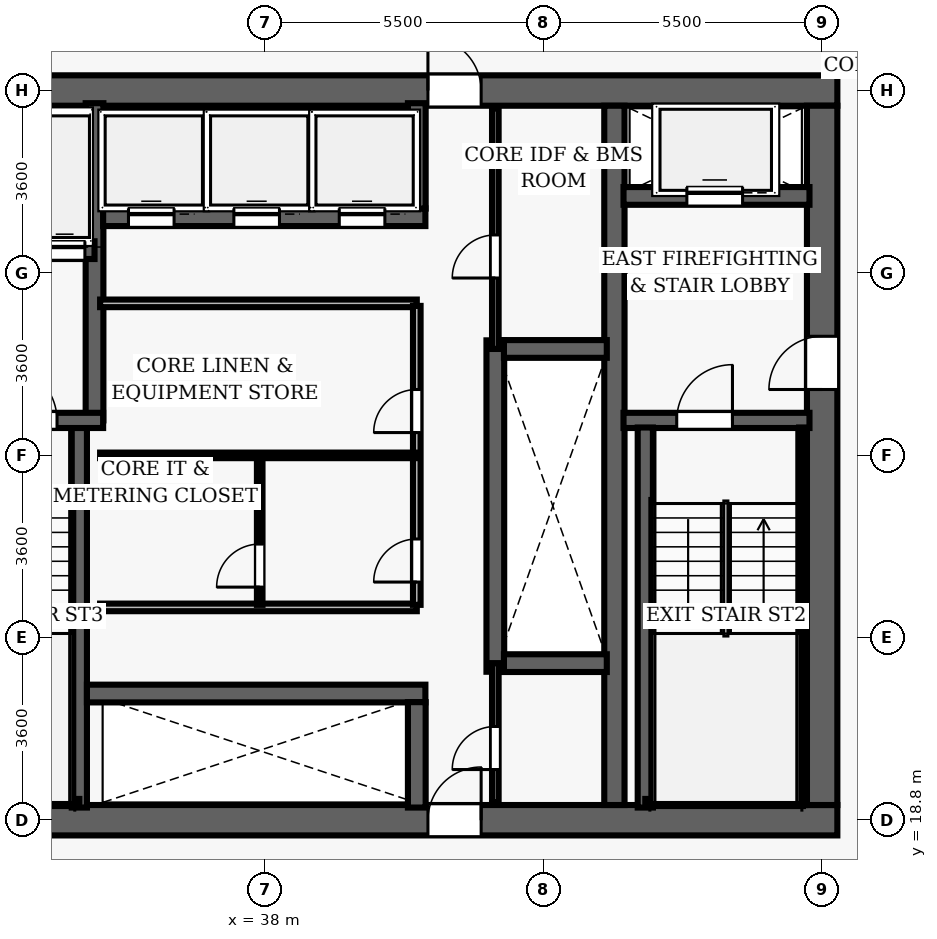
"""IFC4 building model, lengths in metres.
Left out: names, types, materials, properties, quantities, classifications, styles, units other than length and angle.
Written with IfcOpenShell. Run it as: python <this file> out.ifc"""

import sys

from ifc_helpers import new_model, si_unit, direction, frame, frame_2d, origin, place, context, subcontext, project, spatial, rectangle, extrude, element, fill, save


model = new_model("IFC4")
c1 = context("Model", 3, precision=1e-05, world=origin(), true_north=direction((0.0, 1.0)))
c2 = subcontext(c1, "Body", "Model", "MODEL_VIEW")
j1 = project(units=[si_unit("LENGTHUNIT", "METRE"), si_unit("PLANEANGLEUNIT", "RADIAN")], contexts=[c1])
p1 = place(None, origin())
s1 = spatial("IfcSite", under=j1, at=p1, CompositionType="ELEMENT")
p2 = place(p1, origin())
s2 = spatial("IfcBuilding", under=s1, at=p2, CompositionType="ELEMENT")
p3 = place(p2, frame((0.0, 0.0, 79.9)))
s3 = spatial("IfcBuildingStorey", under=s2, at=p3, CompositionType="ELEMENT", Elevation=79.9)
p4 = place(p3, frame((26.7, 18.8, 0.0), z_axis=(0.0, 0.0, 1.0), x_axis=(1.0, 0.0, 0.0)))
e1 = element("IfcWall", 1, at=p4, inside=s3, PredefinedType="SHEAR", context=c2, shape_type="SweptSolid", body=[
    extrude(rectangle(XDim=22.6, YDim=0.6, at=frame_2d((11.3, 0.0))), origin(), (0.0, 0.0, 1.0), 3.5),
])
p5 = place(p4, frame((14.52, 0.0, 0.0)))
e2 = element("IfcOpeningElement", 2, at=p5, cuts=e1, PredefinedType="OPENING", context=c2, shape_type="SweptSolid", body=[
    extrude(rectangle(XDim=1.05, YDim=2.15, at=frame_2d((0.525, 1.075))), frame((0.0, 0.31, 0.0), z_axis=(0.0, -1.0, 0.0), x_axis=(1.0, 0.0, 0.0)), (0.0, 0.0, 1.0), 0.62),
])
p6 = place(p3, frame((26.7, 33.2, 0.0), z_axis=(0.0, 0.0, 1.0), x_axis=(1.0, 0.0, 0.0)))
e3 = element("IfcWall", 3, at=p6, inside=s3, PredefinedType="SHEAR", context=c2, shape_type="SweptSolid", body=[
    extrude(rectangle(XDim=22.6, YDim=0.6, at=frame_2d((11.3, 0.0))), origin(), (0.0, 0.0, 1.0), 3.5),
])
p7 = place(p6, frame((4.62, 0.0, 0.0)))
e4 = element("IfcOpeningElement", 4, at=p7, cuts=e3, PredefinedType="OPENING", context=c2, shape_type="SweptSolid", body=[
    extrude(rectangle(XDim=1.05, YDim=2.15, at=frame_2d((0.525, 1.075))), frame((0.0, 0.31, 0.0), z_axis=(0.0, -1.0, 0.0), x_axis=(1.0, 0.0, 0.0)), (0.0, 0.0, 1.0), 0.62),
])
p8 = place(p6, frame((14.52, 0.0, 0.0)))
e5 = element("IfcOpeningElement", 5, at=p8, cuts=e3, PredefinedType="OPENING", context=c2, shape_type="SweptSolid", body=[
    extrude(rectangle(XDim=1.05, YDim=2.15, at=frame_2d((0.525, 1.075))), frame((0.0, 0.31, 0.0), z_axis=(0.0, -1.0, 0.0), x_axis=(1.0, 0.0, 0.0)), (0.0, 0.0, 1.0), 0.62),
])
p9 = place(p3, frame((49.0, 19.1, 0.0), z_axis=(0.0, 0.0, 1.0), x_axis=(0.0, 1.0, 0.0)))
e6 = element("IfcWall", 6, at=p9, inside=s3, PredefinedType="SHEAR", context=c2, shape_type="SweptSolid", body=[
    extrude(rectangle(XDim=13.8, YDim=0.6, at=frame_2d((6.9, 0.0))), origin(), (0.0, 0.0, 1.0), 3.5),
])
p10 = place(p9, frame((8.2, 0.0, 0.0)))
e7 = element("IfcOpeningElement", 7, at=p10, cuts=e6, PredefinedType="OPENING", context=c2, shape_type="SweptSolid", body=[
    extrude(rectangle(XDim=1.05, YDim=2.15, at=frame_2d((0.525, 1.075))), frame((0.0, 0.31, 0.0), z_axis=(0.0, -1.0, 0.0), x_axis=(1.0, 0.0, 0.0)), (0.0, 0.0, 1.0), 0.62),
])
p11 = place(p3, frame((44.9, 19.1, 0.0), z_axis=(0.0, 0.0, 1.0), x_axis=(0.0, 1.0, 0.0)))
e8 = element("IfcWall", 8, at=p11, inside=s3, PredefinedType="SHEAR", context=c2, shape_type="SweptSolid", body=[
    extrude(rectangle(XDim=13.8, YDim=0.4, at=frame_2d((6.9, 0.0))), origin(), (0.0, 0.0, 1.0), 3.5),
])
p12 = place(p3, frame((45.08, 26.69, 0.0), z_axis=(0.0, 0.0, 1.0), x_axis=(1.0, 0.0, 0.0)))
e9 = element("IfcWall", 9, at=p12, inside=s3, PredefinedType="SHEAR", context=c2, shape_type="SweptSolid", body=[
    extrude(rectangle(XDim=3.67, YDim=0.3, at=frame_2d((1.835, 0.0))), origin(), (0.0, 0.0, 1.0), 3.5),
])
p13 = place(p12, frame((1.05, 0.0, 0.0)))
e10 = element("IfcOpeningElement", 10, at=p13, cuts=e9, PredefinedType="OPENING", context=c2, shape_type="SweptSolid", body=[
    extrude(rectangle(XDim=1.1, YDim=2.15, at=frame_2d((0.55, 1.075))), frame((0.0, 0.16, 0.0), z_axis=(0.0, -1.0, 0.0), x_axis=(1.0, 0.0, 0.0)), (0.0, 0.0, 1.0), 0.32),
])
p14 = place(p3, frame((45.51, 19.05, 0.0), z_axis=(0.0, 0.0, 1.0), x_axis=(0.0, 1.0, 0.0)))
e11 = element("IfcWall", 11, at=p14, inside=s3, PredefinedType="SHEAR", context=c2, shape_type="SweptSolid", body=[
    extrude(rectangle(XDim=7.5, YDim=0.3, at=frame_2d((3.75, 0.0))), origin(), (0.0, 0.0, 1.0), 3.5),
])
p15 = place(p3, frame((48.605, 19.1, 0.0), z_axis=(0.0, 0.0, 1.0), x_axis=(0.0, 1.0, 0.0)))
e12 = element("IfcWall", 12, at=p15, inside=s3, PredefinedType="SHEAR", context=c2, shape_type="SweptSolid", body=[
    extrude(rectangle(XDim=7.45, YDim=0.12, at=frame_2d((3.725, 0.0))), origin(), (0.0, 0.0, 1.0), 3.5),
])
p16 = place(p3, frame((45.51, 19.16, 0.0), z_axis=(0.0, 0.0, 1.0), x_axis=(1.0, 0.0, 0.0)))
e13 = element("IfcWall", 13, at=p16, inside=s3, PredefinedType="SHEAR", context=c2, shape_type="SweptSolid", body=[
    extrude(rectangle(XDim=3.095, YDim=0.12, at=frame_2d((1.547, 0.0))), origin(), (0.0, 0.0, 1.0), 3.5),
])
p17 = place(p3, frame((45.08, 31.12, 0.0), z_axis=(0.0, 0.0, 1.0), x_axis=(1.0, 0.0, 0.0)))
e14 = element("IfcWall", 14, at=p17, inside=s3, PredefinedType="SHEAR", context=c2, shape_type="SweptSolid", body=[
    extrude(rectangle(XDim=3.67, YDim=0.35, at=frame_2d((1.835, 0.0))), origin(), (0.0, 0.0, 1.0), 2.6),
])
p18 = place(p17, frame((1.25, 0.0, 0.0)))
e15 = element("IfcOpeningElement", 15, at=p18, cuts=e14, PredefinedType="OPENING", context=c2, shape_type="SweptSolid", body=[
    extrude(rectangle(XDim=1.1, YDim=2.15, at=frame_2d((0.55, 1.075))), frame((0.0, 0.185, 0.0), z_axis=(0.0, -1.0, 0.0), x_axis=(1.0, 0.0, 0.0)), (0.0, 0.0, 1.0), 0.37),
])
p19 = place(p3, frame((34.34, 19.05, 0.0), z_axis=(0.0, 0.0, 1.0), x_axis=(0.0, 1.0, 0.0)))
e16 = element("IfcWall", 16, at=p19, inside=s3, PredefinedType="SHEAR", context=c2, shape_type="SweptSolid", body=[
    extrude(rectangle(XDim=7.5, YDim=0.3, at=frame_2d((3.75, 0.0))), origin(), (0.0, 0.0, 1.0), 3.5),
])
p20 = place(p3, frame((34.64, 26.69, 0.0), z_axis=(0.0, 0.0, 1.0), x_axis=(0.0, 1.0, 0.0)))
e17 = element("IfcWall", 17, at=p20, inside=s3, PredefinedType="SHEAR", context=c2, shape_type="SweptSolid", body=[
    extrude(rectangle(XDim=6.26, YDim=0.35, at=frame_2d((3.13, 0.0))), origin(), (0.0, 0.0, 1.0), 3.5),
])
p21 = place(p3, frame((31.25, 26.69, 0.0), z_axis=(0.0, 0.0, 1.0), x_axis=(1.0, 0.0, 0.0)))
e18 = element("IfcWall", 18, at=p21, inside=s3, PredefinedType="SHEAR", context=c2, shape_type="SweptSolid", body=[
    extrude(rectangle(XDim=3.56, YDim=0.3, at=frame_2d((1.78, 0.0))), origin(), (0.0, 0.0, 1.0), 3.5),
])
p22 = place(p21, frame((1.55, 0.0, 0.0)))
e19 = element("IfcOpeningElement", 19, at=p22, cuts=e18, PredefinedType="OPENING", context=c2, shape_type="SweptSolid", body=[
    extrude(rectangle(XDim=1.1, YDim=2.15, at=frame_2d((0.55, 1.075))), frame((0.0, 0.16, 0.0), z_axis=(0.0, -1.0, 0.0), x_axis=(1.0, 0.0, 0.0)), (0.0, 0.0, 1.0), 0.32),
])
p23 = place(p3, frame((31.3, 19.16, 0.0), z_axis=(0.0, 0.0, 1.0), x_axis=(1.0, 0.0, 0.0)))
e20 = element("IfcWall", 20, at=p23, inside=s3, PredefinedType="SHEAR", context=c2, shape_type="SweptSolid", body=[
    extrude(rectangle(XDim=3.04, YDim=0.12, at=frame_2d((1.52, 0.0))), origin(), (0.0, 0.0, 1.0), 3.5),
])
p24 = place(p3, frame((32.23, 30.05, 0.0), z_axis=(0.0, 0.0, 1.0), x_axis=(1.0, 0.0, 0.0)))
e21 = element("IfcWall", 21, at=p24, inside=s3, PredefinedType="SHEAR", context=c2, shape_type="SweptSolid", body=[
    extrude(rectangle(XDim=2.41, YDim=0.35, at=frame_2d((1.205, 0.0))), origin(), (0.0, 0.0, 1.0), 2.6),
])
p25 = place(p24, frame((0.42, 0.0, 0.0)))
e22 = element("IfcOpeningElement", 22, at=p25, cuts=e21, PredefinedType="OPENING", context=c2, shape_type="SweptSolid", body=[
    extrude(rectangle(XDim=0.8, YDim=2.15, at=frame_2d((0.4, 1.075))), frame((0.0, 0.185, 0.0), z_axis=(0.0, -1.0, 0.0), x_axis=(1.0, 0.0, 0.0)), (0.0, 0.0, 1.0), 0.37),
])
p26 = place(p24, frame((1.42, 0.0, 0.0)))
e23 = element("IfcOpeningElement", 23, at=p26, cuts=e21, PredefinedType="OPENING", context=c2, shape_type="SweptSolid", body=[
    extrude(rectangle(XDim=0.8, YDim=2.15, at=frame_2d((0.4, 1.075))), frame((0.0, 0.185, 0.0), z_axis=(0.0, -1.0, 0.0), x_axis=(1.0, 0.0, 0.0)), (0.0, 0.0, 1.0), 0.37),
])
p27 = place(p3, frame((42.55, 21.73, 0.0), z_axis=(0.0, 0.0, 1.0), x_axis=(0.0, 1.0, 0.0)))
e24 = element("IfcWall", 24, at=p27, inside=s3, PredefinedType="SHEAR", context=c2, shape_type="SweptSolid", body=[
    extrude(rectangle(XDim=6.54, YDim=0.35, at=frame_2d((3.27, 0.0))), origin(), (0.0, 0.0, 1.0), 2.6),
])
for number, where, z_axis, x_axis in (
    (25, (42.72, 21.9, 0.0), (0.0, 0.0, 1.0), (1.0, 0.0, 0.0)),
    (26, (42.72, 28.1, 0.0), (0.0, 0.0, 1.0), (1.0, 0.0, 0.0)),
):
    element("IfcWall", number, at=place(p3, frame(where, z_axis=z_axis, x_axis=x_axis)), inside=s3, PredefinedType="SHEAR", context=c2, shape_type="SweptSolid", body=[
        extrude(rectangle(XDim=2.03, YDim=0.35, at=frame_2d((1.015, 0.0))), origin(), (0.0, 0.0, 1.0), 2.6),
    ])
p28 = place(p3, frame((34.81, 30.7, 0.0), z_axis=(0.0, 0.0, 1.0), x_axis=(1.0, 0.0, 0.0)))
e27 = element("IfcWall", 27, at=p28, inside=s3, PredefinedType="SHEAR", context=c2, shape_type="SweptSolid", body=[
    extrude(rectangle(XDim=6.36, YDim=0.35, at=frame_2d((3.18, 0.0))), origin(), (0.0, 0.0, 1.0), 2.6),
])
p29 = place(p28, frame((0.5, 0.0, 0.0)))
e28 = element("IfcOpeningElement", 28, at=p29, cuts=e27, PredefinedType="OPENING", context=c2, shape_type="SweptSolid", body=[
    extrude(rectangle(XDim=0.9, YDim=2.15, at=frame_2d((0.45, 1.075))), frame((0.0, 0.185, 0.0), z_axis=(0.0, -1.0, 0.0), x_axis=(1.0, 0.0, 0.0)), (0.0, 0.0, 1.0), 0.37),
])
p30 = place(p28, frame((2.58, 0.0, 0.0)))
e29 = element("IfcOpeningElement", 29, at=p30, cuts=e27, PredefinedType="OPENING", context=c2, shape_type="SweptSolid", body=[
    extrude(rectangle(XDim=0.9, YDim=2.15, at=frame_2d((0.45, 1.075))), frame((0.0, 0.185, 0.0), z_axis=(0.0, -1.0, 0.0), x_axis=(1.0, 0.0, 0.0)), (0.0, 0.0, 1.0), 0.37),
])
p31 = place(p28, frame((4.66, 0.0, 0.0)))
e30 = element("IfcOpeningElement", 30, at=p31, cuts=e27, PredefinedType="OPENING", context=c2, shape_type="SweptSolid", body=[
    extrude(rectangle(XDim=0.9, YDim=2.15, at=frame_2d((0.45, 1.075))), frame((0.0, 0.185, 0.0), z_axis=(0.0, -1.0, 0.0), x_axis=(1.0, 0.0, 0.0)), (0.0, 0.0, 1.0), 0.37),
])
p32 = place(p3, frame((41.0, 30.87, 0.0), z_axis=(0.0, 0.0, 1.0), x_axis=(0.0, 1.0, 0.0)))
e31 = element("IfcWall", 31, at=p32, inside=s3, PredefinedType="SHEAR", context=c2, shape_type="SweptSolid", body=[
    extrude(rectangle(XDim=2.08, YDim=0.35, at=frame_2d((1.04, 0.0))), origin(), (0.0, 0.0, 1.0), 2.6),
])
p33 = place(p3, frame((34.49, 21.3, 0.0), z_axis=(0.0, 0.0, 1.0), x_axis=(1.0, 0.0, 0.0)))
e32 = element("IfcWall", 32, at=p33, inside=s3, PredefinedType="SHEAR", context=c2, shape_type="SweptSolid", body=[
    extrude(rectangle(XDim=6.68, YDim=0.35, at=frame_2d((3.34, 0.0))), origin(), (0.0, 0.0, 1.0), 2.6),
])
p34 = place(p3, frame((41.0, 19.05, 0.0), z_axis=(0.0, 0.0, 1.0), x_axis=(0.0, 1.0, 0.0)))
e33 = element("IfcWall", 33, at=p34, inside=s3, PredefinedType="SHEAR", context=c2, shape_type="SweptSolid", body=[
    extrude(rectangle(XDim=2.08, YDim=0.35, at=frame_2d((1.04, 0.0))), origin(), (0.0, 0.0, 1.0), 2.6),
])
for number, where, z_axis, x_axis in (
    (34, (34.75, 29.0, 0.0), (0.0, 0.0, 1.0), (1.0, 0.0, 0.0)),
    (35, (34.75, 23.0, 0.0), (0.0, 0.0, 1.0), (1.0, 0.0, 0.0)),
):
    element("IfcWall", number, at=place(p3, frame(where, z_axis=z_axis, x_axis=x_axis)), inside=s3, PredefinedType="PARTITIONING", context=c2, shape_type="SweptSolid", body=[
        extrude(rectangle(XDim=6.25, YDim=0.15, at=frame_2d((3.125, 0.0))), origin(), (0.0, 0.0, 1.0), 2.6),
    ])
p35 = place(p3, frame((41.0, 23.05, 0.0), z_axis=(0.0, 0.0, 1.0), x_axis=(0.0, 1.0, 0.0)))
e36 = element("IfcWall", 36, at=p35, inside=s3, PredefinedType="PARTITIONING", context=c2, shape_type="SweptSolid", body=[
    extrude(rectangle(XDim=5.9, YDim=0.15, at=frame_2d((2.95, 0.0))), origin(), (0.0, 0.0, 1.0), 2.6),
])
p36 = place(p35, frame((3.4, 0.0, 0.0)))
e37 = element("IfcOpeningElement", 37, at=p36, cuts=e36, PredefinedType="OPENING", context=c2, shape_type="SweptSolid", body=[
    extrude(rectangle(XDim=0.85, YDim=2.1, at=frame_2d((0.425, 1.05))), frame((0.0, 0.085, 0.0), z_axis=(0.0, -1.0, 0.0), x_axis=(1.0, 0.0, 0.0)), (0.0, 0.0, 1.0), 0.17),
])
p37 = place(p35, frame((0.45, 0.0, 0.0)))
e38 = element("IfcOpeningElement", 38, at=p37, cuts=e36, PredefinedType="OPENING", context=c2, shape_type="SweptSolid", body=[
    extrude(rectangle(XDim=0.85, YDim=2.1, at=frame_2d((0.425, 1.05))), frame((0.0, 0.085, 0.0), z_axis=(0.0, -1.0, 0.0), x_axis=(1.0, 0.0, 0.0)), (0.0, 0.0, 1.0), 0.17),
])
p38 = place(p3, frame((34.75, 26.0, 0.0), z_axis=(0.0, 0.0, 1.0), x_axis=(1.0, 0.0, 0.0)))
e39 = element("IfcWall", 39, at=p38, inside=s3, PredefinedType="PARTITIONING", context=c2, shape_type="SweptSolid", body=[
    extrude(rectangle(XDim=6.25, YDim=0.11, at=frame_2d((3.125, 0.0))), origin(), (0.0, 0.0, 1.0), 2.6),
])
p39 = place(p3, frame((37.9, 23.05, 0.0), z_axis=(0.0, 0.0, 1.0), x_axis=(0.0, 1.0, 0.0)))
e40 = element("IfcWall", 40, at=p39, inside=s3, PredefinedType="PARTITIONING", context=c2, shape_type="SweptSolid", body=[
    extrude(rectangle(XDim=2.95, YDim=0.11, at=frame_2d((1.475, 0.0))), origin(), (0.0, 0.0, 1.0), 2.6),
])
p40 = place(p39, frame((0.35, 0.0, 0.0)))
e41 = element("IfcOpeningElement", 41, at=p40, cuts=e40, PredefinedType="OPENING", context=c2, shape_type="SweptSolid", body=[
    extrude(rectangle(XDim=0.85, YDim=2.1, at=frame_2d((0.425, 1.05))), frame((0.0, 0.065, 0.0), z_axis=(0.0, -1.0, 0.0), x_axis=(1.0, 0.0, 0.0)), (0.0, 0.0, 1.0), 0.13),
])
p41 = place(p3, frame((42.55, 28.1, 0.0), z_axis=(0.0, 0.0, 1.0), x_axis=(0.0, 1.0, 0.0)))
e42 = element("IfcWall", 42, at=p41, inside=s3, PredefinedType="PARTITIONING", context=c2, shape_type="SweptSolid", body=[
    extrude(rectangle(XDim=4.75, YDim=0.13, at=frame_2d((2.375, 0.0))), origin(), (0.0, 0.0, 1.0), 2.6),
])
p42 = place(p41, frame((1.4, 0.0, 0.0)))
e43 = element("IfcOpeningElement", 43, at=p42, cuts=e42, PredefinedType="OPENING", context=c2, shape_type="SweptSolid", body=[
    extrude(rectangle(XDim=0.85, YDim=2.1, at=frame_2d((0.425, 1.05))), frame((0.0, 0.075, 0.0), z_axis=(0.0, -1.0, 0.0), x_axis=(1.0, 0.0, 0.0)), (0.0, 0.0, 1.0), 0.15),
])
p43 = place(p3, frame((42.55, 19.15, 0.0), z_axis=(0.0, 0.0, 1.0), x_axis=(0.0, 1.0, 0.0)))
e44 = element("IfcWall", 44, at=p43, inside=s3, PredefinedType="PARTITIONING", context=c2, shape_type="SweptSolid", body=[
    extrude(rectangle(XDim=2.75, YDim=0.13, at=frame_2d((1.375, 0.0))), origin(), (0.0, 0.0, 1.0), 2.6),
])
p44 = place(p43, frame((0.65, 0.0, 0.0)))
e45 = element("IfcOpeningElement", 45, at=p44, cuts=e44, PredefinedType="OPENING", context=c2, shape_type="SweptSolid", body=[
    extrude(rectangle(XDim=0.85, YDim=2.1, at=frame_2d((0.425, 1.05))), frame((0.0, 0.075, 0.0), z_axis=(0.0, -1.0, 0.0), x_axis=(1.0, 0.0, 0.0)), (0.0, 0.0, 1.0), 0.15),
])
p45 = place(p13, origin())
e46 = element("IfcDoor", 46, at=p45, inside=s3, OperationType="SINGLE_SWING_RIGHT", PredefinedType="DOOR", context=c2, shape_type="SweptSolid", body=[
    extrude(rectangle(XDim=1.1, YDim=2.15, at=frame_2d((0.55, 1.075))), frame((0.0, 0.025, 0.0), z_axis=(0.0, -1.0, 0.0), x_axis=(1.0, 0.0, 0.0)), (0.0, 0.0, 1.0), 0.05),
])
fill(e10, e46)
p46 = place(p10, origin())
e47 = element("IfcDoor", 47, at=p46, inside=s3, OperationType="SINGLE_SWING_LEFT", PredefinedType="DOOR", context=c2, shape_type="SweptSolid", body=[
    extrude(rectangle(XDim=1.05, YDim=2.15, at=frame_2d((0.525, 1.075))), frame((0.0, 0.025, 0.0), z_axis=(0.0, -1.0, 0.0), x_axis=(1.0, 0.0, 0.0)), (0.0, 0.0, 1.0), 0.05),
])
fill(e7, e47)
p47 = place(p22, origin())
e48 = element("IfcDoor", 48, at=p47, inside=s3, OperationType="SINGLE_SWING_LEFT", PredefinedType="DOOR", context=c2, shape_type="SweptSolid", body=[
    extrude(rectangle(XDim=1.1, YDim=2.15, at=frame_2d((0.55, 1.075))), frame((0.0, 0.025, 0.0), z_axis=(0.0, -1.0, 0.0), x_axis=(1.0, 0.0, 0.0)), (0.0, 0.0, 1.0), 0.05),
])
fill(e19, e48)
p48 = place(p8, origin())
e49 = element("IfcDoor", 49, at=p48, inside=s3, OperationType="SINGLE_SWING_LEFT", PredefinedType="DOOR", context=c2, shape_type="SweptSolid", body=[
    extrude(rectangle(XDim=1.05, YDim=2.15, at=frame_2d((0.525, 1.075))), frame((0.0, 0.025, 0.0), z_axis=(0.0, -1.0, 0.0), x_axis=(1.0, 0.0, 0.0)), (0.0, 0.0, 1.0), 0.05),
])
fill(e5, e49)
p49 = place(p5, origin())
e50 = element("IfcDoor", 50, at=p49, inside=s3, OperationType="SINGLE_SWING_RIGHT", PredefinedType="DOOR", context=c2, shape_type="SweptSolid", body=[
    extrude(rectangle(XDim=1.05, YDim=2.15, at=frame_2d((0.525, 1.075))), frame((0.0, 0.025, 0.0), z_axis=(0.0, -1.0, 0.0), x_axis=(1.0, 0.0, 0.0)), (0.0, 0.0, 1.0), 0.05),
])
fill(e2, e50)
p50 = place(p36, origin())
e51 = element("IfcDoor", 51, at=p50, inside=s3, OperationType="SINGLE_SWING_LEFT", PredefinedType="DOOR", context=c2, shape_type="SweptSolid", body=[
    extrude(rectangle(XDim=0.85, YDim=2.1, at=frame_2d((0.425, 1.05))), frame((0.0, 0.025, 0.0), z_axis=(0.0, -1.0, 0.0), x_axis=(1.0, 0.0, 0.0)), (0.0, 0.0, 1.0), 0.05),
])
fill(e37, e51)
p51 = place(p37, origin())
e52 = element("IfcDoor", 52, at=p51, inside=s3, OperationType="SINGLE_SWING_LEFT", PredefinedType="DOOR", context=c2, shape_type="SweptSolid", body=[
    extrude(rectangle(XDim=0.85, YDim=2.1, at=frame_2d((0.425, 1.05))), frame((0.0, 0.025, 0.0), z_axis=(0.0, -1.0, 0.0), x_axis=(1.0, 0.0, 0.0)), (0.0, 0.0, 1.0), 0.05),
])
fill(e38, e52)
p52 = place(p40, origin())
e53 = element("IfcDoor", 53, at=p52, inside=s3, OperationType="SINGLE_SWING_LEFT", PredefinedType="DOOR", context=c2, shape_type="SweptSolid", body=[
    extrude(rectangle(XDim=0.85, YDim=2.1, at=frame_2d((0.425, 1.05))), frame((0.0, 0.025, 0.0), z_axis=(0.0, -1.0, 0.0), x_axis=(1.0, 0.0, 0.0)), (0.0, 0.0, 1.0), 0.05),
])
fill(e41, e53)
p53 = place(p42, origin())
e54 = element("IfcDoor", 54, at=p53, inside=s3, OperationType="SINGLE_SWING_LEFT", PredefinedType="DOOR", context=c2, shape_type="SweptSolid", body=[
    extrude(rectangle(XDim=0.85, YDim=2.1, at=frame_2d((0.425, 1.05))), frame((0.0, 0.025, 0.0), z_axis=(0.0, -1.0, 0.0), x_axis=(1.0, 0.0, 0.0)), (0.0, 0.0, 1.0), 0.05),
])
fill(e43, e54)
p54 = place(p44, origin())
e55 = element("IfcDoor", 55, at=p54, inside=s3, OperationType="SINGLE_SWING_LEFT", PredefinedType="DOOR", context=c2, shape_type="SweptSolid", body=[
    extrude(rectangle(XDim=0.85, YDim=2.1, at=frame_2d((0.425, 1.05))), frame((0.0, 0.025, 0.0), z_axis=(0.0, -1.0, 0.0), x_axis=(1.0, 0.0, 0.0)), (0.0, 0.0, 1.0), 0.05),
])
fill(e45, e55)
p55 = place(p29, origin())
e56 = element("IfcDoor", 56, at=p55, inside=s3, OperationType="SLIDING_TO_LEFT", PredefinedType="DOOR", context=c2, shape_type="SweptSolid", body=[
    extrude(rectangle(XDim=0.9, YDim=2.15, at=frame_2d((0.45, 1.075))), frame((0.0, 0.025, 0.0), z_axis=(0.0, -1.0, 0.0), x_axis=(1.0, 0.0, 0.0)), (0.0, 0.0, 1.0), 0.05),
])
fill(e28, e56)
p56 = place(p30, origin())
e57 = element("IfcDoor", 57, at=p56, inside=s3, OperationType="SLIDING_TO_LEFT", PredefinedType="DOOR", context=c2, shape_type="SweptSolid", body=[
    extrude(rectangle(XDim=0.9, YDim=2.15, at=frame_2d((0.45, 1.075))), frame((0.0, 0.025, 0.0), z_axis=(0.0, -1.0, 0.0), x_axis=(1.0, 0.0, 0.0)), (0.0, 0.0, 1.0), 0.05),
])
fill(e29, e57)
p57 = place(p31, origin())
e58 = element("IfcDoor", 58, at=p57, inside=s3, OperationType="SLIDING_TO_LEFT", PredefinedType="DOOR", context=c2, shape_type="SweptSolid", body=[
    extrude(rectangle(XDim=0.9, YDim=2.15, at=frame_2d((0.45, 1.075))), frame((0.0, 0.025, 0.0), z_axis=(0.0, -1.0, 0.0), x_axis=(1.0, 0.0, 0.0)), (0.0, 0.0, 1.0), 0.05),
])
fill(e30, e58)
p58 = place(p18, origin())
e59 = element("IfcDoor", 59, at=p58, inside=s3, OperationType="SLIDING_TO_LEFT", PredefinedType="DOOR", context=c2, shape_type="SweptSolid", body=[
    extrude(rectangle(XDim=1.1, YDim=2.15, at=frame_2d((0.55, 1.075))), frame((0.0, 0.025, 0.0), z_axis=(0.0, -1.0, 0.0), x_axis=(1.0, 0.0, 0.0)), (0.0, 0.0, 1.0), 0.05),
])
fill(e15, e59)
p59 = place(p26, origin())
e60 = element("IfcDoor", 60, at=p59, inside=s3, OperationType="SLIDING_TO_LEFT", PredefinedType="DOOR", context=c2, shape_type="SweptSolid", body=[
    extrude(rectangle(XDim=0.8, YDim=2.15, at=frame_2d((0.4, 1.075))), frame((0.0, 0.025, 0.0), z_axis=(0.0, -1.0, 0.0), x_axis=(1.0, 0.0, 0.0)), (0.0, 0.0, 1.0), 0.05),
])
fill(e23, e60)
save(model, sys.argv[1])
